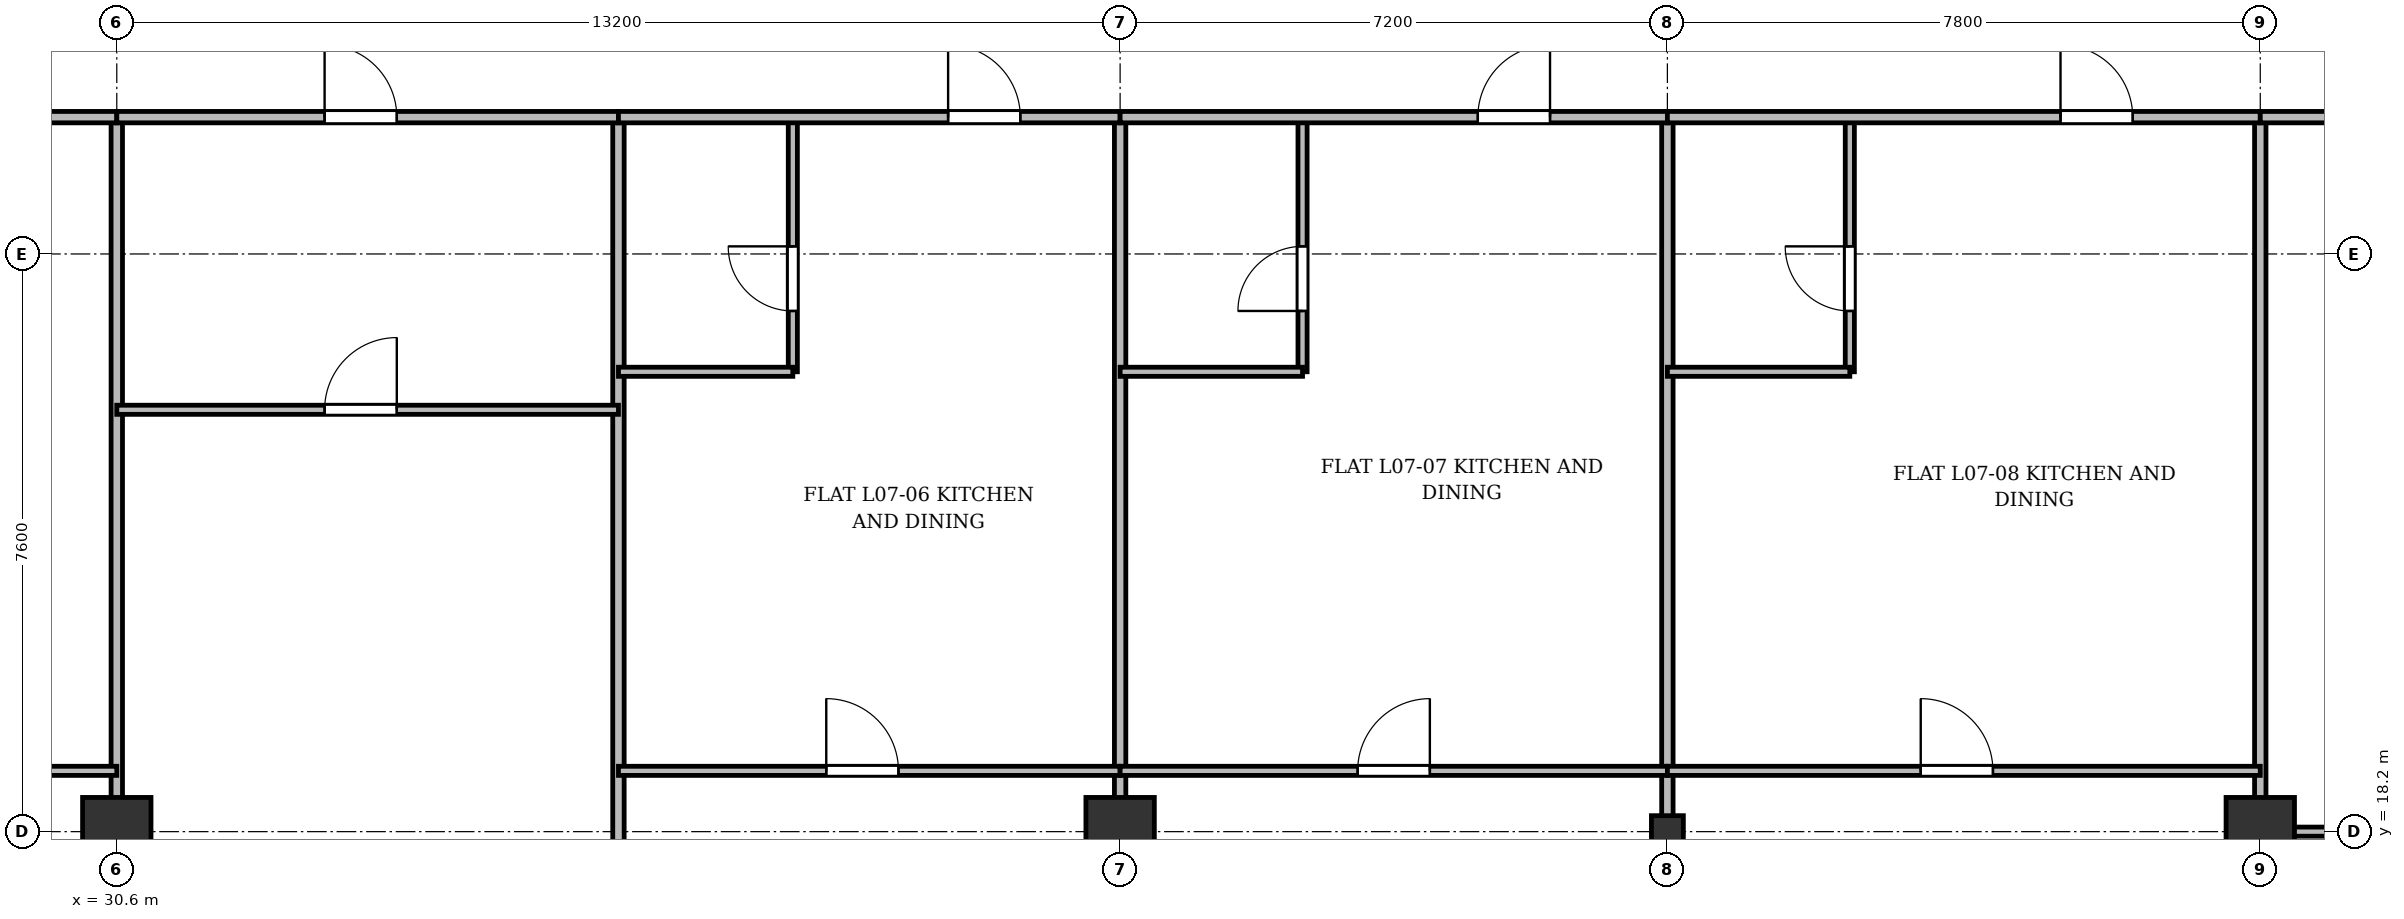
"""IFC4 building model, lengths in metres.
Left out: names, types, materials, properties, quantities, classifications, styles, units other than length and angle.
Written with IfcOpenShell. Run it as: python <this file> out.ifc"""

import sys

from ifc_helpers import new_model, si_unit, direction, frame, frame_2d, origin, origin_2d, place, context, subcontext, project, spatial, rectangle, i_section, extrude, source, transform, mapped, element, fill, save


model = new_model("IFC4")
c1 = context("Model", 3, precision=1e-05, world=origin(), true_north=direction((0.0, 1.0)))
c2 = subcontext(c1, "Body", "Model", "MODEL_VIEW")
j1 = project(units=[si_unit("LENGTHUNIT", "METRE"), si_unit("PLANEANGLEUNIT", "RADIAN")], contexts=[c1])
p1 = place(None, origin())
s1 = spatial("IfcSite", under=j1, at=p1, CompositionType="ELEMENT")
p2 = place(p1, origin())
s2 = spatial("IfcBuilding", under=s1, at=p2, CompositionType="ELEMENT")
p3 = place(p2, frame((0.0, 0.0, 30.7)))
s3 = spatial("IfcBuildingStorey", under=s2, at=p3, CompositionType="ELEMENT", Elevation=30.7)
m1 = source(origin(), c2, "Body", "SweptSolid", [
    extrude(rectangle(XDim=0.9, YDim=0.9, at=origin_2d()), origin(), (0.0, 0.0, 1.0), 3.6),
])
for number, where, z_axis, x_axis in (
    (1, (30.6, 18.2, 0.0), (0.0, 0.0, 1.0), (1.0, 0.0, 0.0)),
    (2, (43.8, 18.2, 0.0), (0.0, 0.0, 1.0), (1.0, 0.0, 0.0)),
):
    element("IfcColumn", number, at=place(p3, frame(where, z_axis=z_axis, x_axis=x_axis)), inside=s3, PredefinedType="COLUMN", context=c2, shape_type="MappedRepresentation", body=[
        mapped(m1, transform((0.0, 0.0, 0.0), x_axis=(1.0, 0.0, 0.0), y_axis=(0.0, 1.0, 0.0), z_axis=(0.0, 0.0, 1.0), scale=1.0)),
    ])
m2 = source(origin(), c2, "Body", "SweptSolid", [
    extrude(i_section(OverallWidth=0.42, OverallDepth=0.42, WebThickness=0.026, FlangeThickness=0.04, at=origin_2d()), origin(), (0.0, 0.0, 1.0), 3.6),
])
p4 = place(p3, frame((51.0, 18.2, 0.0), z_axis=(0.0, 0.0, 1.0), x_axis=(1.0, 0.0, 0.0)))
e3 = element("IfcColumn", 3, at=p4, inside=s3, PredefinedType="COLUMN", context=c2, shape_type="MappedRepresentation", body=[
    mapped(m2, transform((0.0, 0.0, 0.0), x_axis=(1.0, 0.0, 0.0), y_axis=(0.0, 1.0, 0.0), z_axis=(0.0, 0.0, 1.0), scale=1.0)),
])
p5 = place(p3, frame((58.8, 18.2, 0.0), z_axis=(0.0, 0.0, 1.0), x_axis=(1.0, 0.0, 0.0)))
e4 = element("IfcColumn", 4, at=p5, inside=s3, PredefinedType="COLUMN", context=c2, shape_type="MappedRepresentation", body=[
    mapped(m1, transform((0.0, 0.0, 0.0), x_axis=(1.0, 0.0, 0.0), y_axis=(0.0, 1.0, 0.0), z_axis=(0.0, 0.0, 1.0), scale=1.0)),
])
p6 = place(p3, frame((30.6, 3.145, 0.0), z_axis=(0.0, 0.0, 1.0), x_axis=(0.0, 1.0, 0.0)))
e5 = element("IfcWall", 5, at=p6, inside=s3, PredefinedType="PARTITIONING", context=c2, shape_type="SweptSolid", body=[
    extrude(rectangle(XDim=24.455, YDim=0.15, at=frame_2d((12.228, 0.0))), origin(), (0.0, 0.0, 1.0), 2.752),
])
p7 = place(p3, frame((37.2, 3.145, 0.0), z_axis=(0.0, 0.0, 1.0), x_axis=(0.0, 1.0, 0.0)))
e6 = element("IfcWall", 6, at=p7, inside=s3, PredefinedType="PARTITIONING", context=c2, shape_type="SweptSolid", body=[
    extrude(rectangle(XDim=24.455, YDim=0.15, at=frame_2d((12.228, 0.0))), origin(), (0.0, 0.0, 1.0), 2.69),
])
for number, where, z_axis, x_axis in (
    (7, (43.8, 3.145, 0.0), (0.0, 0.0, 1.0), (0.0, 1.0, 0.0)),
    (8, (51.0, 3.145, 0.0), (0.0, 0.0, 1.0), (0.0, 1.0, 0.0)),
    (9, (58.8, 3.145, 0.0), (0.0, 0.0, 1.0), (0.0, 1.0, 0.0)),
):
    element("IfcWall", number, at=place(p3, frame(where, z_axis=z_axis, x_axis=x_axis)), inside=s3, PredefinedType="PARTITIONING", context=c2, shape_type="SweptSolid", body=[
        extrude(rectangle(XDim=24.455, YDim=0.15, at=frame_2d((12.228, 0.0))), origin(), (0.0, 0.0, 1.0), 2.752),
    ])
p8 = place(p3, frame((23.4, 19.0, 0.0), z_axis=(0.0, 0.0, 1.0), x_axis=(1.0, 0.0, 0.0)))
e10 = element("IfcWall", 10, at=p8, inside=s3, PredefinedType="PARTITIONING", context=c2, shape_type="SweptSolid", body=[
    extrude(rectangle(XDim=7.2, YDim=0.12, at=frame_2d((3.6, 0.0))), origin(), (0.0, 0.0, 1.0), 2.752),
])
p9 = place(p8, frame((3.125, 0.0, 0.0)))
e11 = element("IfcOpeningElement", 11, at=p9, cuts=e10, PredefinedType="OPENING", context=c2, shape_type="SweptSolid", body=[
    extrude(rectangle(XDim=0.95, YDim=2.15, at=frame_2d((0.475, 1.075))), frame((0.0, 0.07, 0.0), z_axis=(0.0, -1.0, 0.0), x_axis=(1.0, 0.0, 0.0)), (0.0, 0.0, 1.0), 0.14),
])
p10 = place(p3, frame((23.4, 27.6, 0.0), z_axis=(0.0, 0.0, 1.0), x_axis=(1.0, 0.0, 0.0)))
e12 = element("IfcWall", 12, at=p10, inside=s3, PredefinedType="PARTITIONING", context=c2, shape_type="SweptSolid", body=[
    extrude(rectangle(XDim=7.2, YDim=0.15, at=frame_2d((3.6, 0.0))), origin(), (0.0, 0.0, 1.0), 2.752),
])
p11 = place(p10, frame((4.706, 0.0, 0.0)))
e13 = element("IfcOpeningElement", 13, at=p11, cuts=e12, PredefinedType="OPENING", context=c2, shape_type="SweptSolid", body=[
    extrude(rectangle(XDim=0.95, YDim=2.15, at=frame_2d((0.475, 1.075))), frame((0.0, 0.085, 0.0), z_axis=(0.0, -1.0, 0.0), x_axis=(1.0, 0.0, 0.0)), (0.0, 0.0, 1.0), 0.17),
])
p12 = place(p3, frame((30.6, 27.6, 0.0), z_axis=(0.0, 0.0, 1.0), x_axis=(1.0, 0.0, 0.0)))
e14 = element("IfcWall", 14, at=p12, inside=s3, PredefinedType="PARTITIONING", context=c2, shape_type="SweptSolid", body=[
    extrude(rectangle(XDim=6.6, YDim=0.15, at=frame_2d((3.3, 0.0))), origin(), (0.0, 0.0, 1.0), 2.752),
])
p13 = place(p12, frame((2.734, 0.0, 0.0)))
e15 = element("IfcOpeningElement", 15, at=p13, cuts=e14, PredefinedType="OPENING", context=c2, shape_type="SweptSolid", body=[
    extrude(rectangle(XDim=0.95, YDim=2.15, at=frame_2d((0.475, 1.075))), frame((0.0, 0.085, 0.0), z_axis=(0.0, -1.0, 0.0), x_axis=(1.0, 0.0, 0.0)), (0.0, 0.0, 1.0), 0.17),
])
p14 = place(p3, frame((30.6, 23.75, 0.0), z_axis=(0.0, 0.0, 1.0), x_axis=(1.0, 0.0, 0.0)))
e16 = element("IfcWall", 16, at=p14, inside=s3, PredefinedType="PARTITIONING", context=c2, shape_type="SweptSolid", body=[
    extrude(rectangle(XDim=6.6, YDim=0.12, at=frame_2d((3.3, 0.0))), origin(), (0.0, 0.0, 1.0), 2.752),
])
p15 = place(p14, frame((2.734, 0.0, 0.0)))
e17 = element("IfcOpeningElement", 17, at=p15, cuts=e16, PredefinedType="OPENING", context=c2, shape_type="SweptSolid", body=[
    extrude(rectangle(XDim=0.95, YDim=2.15, at=frame_2d((0.475, 1.075))), frame((0.0, 0.07, 0.0), z_axis=(0.0, -1.0, 0.0), x_axis=(1.0, 0.0, 0.0)), (0.0, 0.0, 1.0), 0.14),
])
p16 = place(p3, frame((37.2, 19.0, 0.0), z_axis=(0.0, 0.0, 1.0), x_axis=(1.0, 0.0, 0.0)))
e18 = element("IfcWall", 18, at=p16, inside=s3, PredefinedType="PARTITIONING", context=c2, shape_type="SweptSolid", body=[
    extrude(rectangle(XDim=6.6, YDim=0.12, at=frame_2d((3.3, 0.0))), origin(), (0.0, 0.0, 1.0), 2.752),
])
p17 = place(p16, frame((2.734, 0.0, 0.0)))
e19 = element("IfcOpeningElement", 19, at=p17, cuts=e18, PredefinedType="OPENING", context=c2, shape_type="SweptSolid", body=[
    extrude(rectangle(XDim=0.95, YDim=2.15, at=frame_2d((0.475, 1.075))), frame((0.0, 0.07, 0.0), z_axis=(0.0, -1.0, 0.0), x_axis=(1.0, 0.0, 0.0)), (0.0, 0.0, 1.0), 0.14),
])
p18 = place(p3, frame((39.494, 24.25, 0.0), z_axis=(0.0, 0.0, 1.0), x_axis=(0.0, 1.0, 0.0)))
e20 = element("IfcWall", 20, at=p18, inside=s3, PredefinedType="PARTITIONING", context=c2, shape_type="SweptSolid", body=[
    extrude(rectangle(XDim=3.35, YDim=0.12, at=frame_2d((1.675, 0.0))), origin(), (0.0, 0.0, 1.0), 2.94),
])
p19 = place(p18, frame((0.8, 0.0, 0.0)))
e21 = element("IfcOpeningElement", 21, at=p19, cuts=e20, PredefinedType="OPENING", context=c2, shape_type="SweptSolid", body=[
    extrude(rectangle(XDim=0.85, YDim=2.1, at=frame_2d((0.425, 1.05))), frame((0.0, 0.07, 0.0), z_axis=(0.0, -1.0, 0.0), x_axis=(1.0, 0.0, 0.0)), (0.0, 0.0, 1.0), 0.14),
])
p20 = place(p3, frame((37.2, 24.25, 0.0), z_axis=(0.0, 0.0, 1.0), x_axis=(1.0, 0.0, 0.0)))
e22 = element("IfcWall", 22, at=p20, inside=s3, PredefinedType="PARTITIONING", context=c2, shape_type="SweptSolid", body=[
    extrude(rectangle(XDim=2.294, YDim=0.12, at=frame_2d((1.147, 0.0))), origin(), (0.0, 0.0, 1.0), 3.34),
])
p21 = place(p3, frame((37.2, 27.6, 0.0), z_axis=(0.0, 0.0, 1.0), x_axis=(1.0, 0.0, 0.0)))
e23 = element("IfcWall", 23, at=p21, inside=s3, PredefinedType="PARTITIONING", context=c2, shape_type="SweptSolid", body=[
    extrude(rectangle(XDim=6.6, YDim=0.15, at=frame_2d((3.3, 0.0))), origin(), (0.0, 0.0, 1.0), 2.752),
])
p22 = place(p21, frame((4.337, 0.0, 0.0)))
e24 = element("IfcOpeningElement", 24, at=p22, cuts=e23, PredefinedType="OPENING", context=c2, shape_type="SweptSolid", body=[
    extrude(rectangle(XDim=0.95, YDim=2.15, at=frame_2d((0.475, 1.075))), frame((0.0, 0.085, 0.0), z_axis=(0.0, -1.0, 0.0), x_axis=(1.0, 0.0, 0.0)), (0.0, 0.0, 1.0), 0.17),
])
p23 = place(p3, frame((43.8, 19.0, 0.0), z_axis=(0.0, 0.0, 1.0), x_axis=(1.0, 0.0, 0.0)))
e25 = element("IfcWall", 25, at=p23, inside=s3, PredefinedType="PARTITIONING", context=c2, shape_type="SweptSolid", body=[
    extrude(rectangle(XDim=7.2, YDim=0.12, at=frame_2d((3.6, 0.0))), origin(), (0.0, 0.0, 1.0), 2.752),
])
p24 = place(p23, frame((3.125, 0.0, 0.0)))
e26 = element("IfcOpeningElement", 26, at=p24, cuts=e25, PredefinedType="OPENING", context=c2, shape_type="SweptSolid", body=[
    extrude(rectangle(XDim=0.95, YDim=2.15, at=frame_2d((0.475, 1.075))), frame((0.0, 0.07, 0.0), z_axis=(0.0, -1.0, 0.0), x_axis=(1.0, 0.0, 0.0)), (0.0, 0.0, 1.0), 0.14),
])
p25 = place(p3, frame((46.2, 24.25, 0.0), z_axis=(0.0, 0.0, 1.0), x_axis=(0.0, 1.0, 0.0)))
e27 = element("IfcWall", 27, at=p25, inside=s3, PredefinedType="PARTITIONING", context=c2, shape_type="SweptSolid", body=[
    extrude(rectangle(XDim=3.35, YDim=0.12, at=frame_2d((1.675, 0.0))), origin(), (0.0, 0.0, 1.0), 2.94),
])
p26 = place(p25, frame((0.8, 0.0, 0.0)))
e28 = element("IfcOpeningElement", 28, at=p26, cuts=e27, PredefinedType="OPENING", context=c2, shape_type="SweptSolid", body=[
    extrude(rectangle(XDim=0.85, YDim=2.1, at=frame_2d((0.425, 1.05))), frame((0.0, 0.07, 0.0), z_axis=(0.0, -1.0, 0.0), x_axis=(1.0, 0.0, 0.0)), (0.0, 0.0, 1.0), 0.14),
])
p27 = place(p3, frame((43.8, 24.25, 0.0), z_axis=(0.0, 0.0, 1.0), x_axis=(1.0, 0.0, 0.0)))
e29 = element("IfcWall", 29, at=p27, inside=s3, PredefinedType="PARTITIONING", context=c2, shape_type="SweptSolid", body=[
    extrude(rectangle(XDim=2.4, YDim=0.12, at=frame_2d((1.2, 0.0))), origin(), (0.0, 0.0, 1.0), 2.752),
])
p28 = place(p3, frame((43.8, 27.6, 0.0), z_axis=(0.0, 0.0, 1.0), x_axis=(1.0, 0.0, 0.0)))
e30 = element("IfcWall", 30, at=p28, inside=s3, PredefinedType="PARTITIONING", context=c2, shape_type="SweptSolid", body=[
    extrude(rectangle(XDim=7.2, YDim=0.15, at=frame_2d((3.6, 0.0))), origin(), (0.0, 0.0, 1.0), 2.752),
])
p29 = place(p28, frame((4.706, 0.0, 0.0)))
e31 = element("IfcOpeningElement", 31, at=p29, cuts=e30, PredefinedType="OPENING", context=c2, shape_type="SweptSolid", body=[
    extrude(rectangle(XDim=0.95, YDim=2.15, at=frame_2d((0.475, 1.075))), frame((0.0, 0.085, 0.0), z_axis=(0.0, -1.0, 0.0), x_axis=(1.0, 0.0, 0.0)), (0.0, 0.0, 1.0), 0.17),
])
p30 = place(p3, frame((51.0, 19.0, 0.0), z_axis=(0.0, 0.0, 1.0), x_axis=(1.0, 0.0, 0.0)))
e32 = element("IfcWall", 32, at=p30, inside=s3, PredefinedType="PARTITIONING", context=c2, shape_type="SweptSolid", body=[
    extrude(rectangle(XDim=7.8, YDim=0.12, at=frame_2d((3.9, 0.0))), origin(), (0.0, 0.0, 1.0), 2.752),
])
p31 = place(p30, frame((3.333, 0.0, 0.0)))
e33 = element("IfcOpeningElement", 33, at=p31, cuts=e32, PredefinedType="OPENING", context=c2, shape_type="SweptSolid", body=[
    extrude(rectangle(XDim=0.95, YDim=2.15, at=frame_2d((0.475, 1.075))), frame((0.0, 0.07, 0.0), z_axis=(0.0, -1.0, 0.0), x_axis=(1.0, 0.0, 0.0)), (0.0, 0.0, 1.0), 0.14),
])
p32 = place(p3, frame((53.4, 24.25, 0.0), z_axis=(0.0, 0.0, 1.0), x_axis=(0.0, 1.0, 0.0)))
e34 = element("IfcWall", 34, at=p32, inside=s3, PredefinedType="PARTITIONING", context=c2, shape_type="SweptSolid", body=[
    extrude(rectangle(XDim=3.35, YDim=0.12, at=frame_2d((1.675, 0.0))), origin(), (0.0, 0.0, 1.0), 2.94),
])
p33 = place(p32, frame((0.8, 0.0, 0.0)))
e35 = element("IfcOpeningElement", 35, at=p33, cuts=e34, PredefinedType="OPENING", context=c2, shape_type="SweptSolid", body=[
    extrude(rectangle(XDim=0.85, YDim=2.1, at=frame_2d((0.425, 1.05))), frame((0.0, 0.07, 0.0), z_axis=(0.0, -1.0, 0.0), x_axis=(1.0, 0.0, 0.0)), (0.0, 0.0, 1.0), 0.14),
])
p34 = place(p3, frame((51.0, 24.25, 0.0), z_axis=(0.0, 0.0, 1.0), x_axis=(1.0, 0.0, 0.0)))
e36 = element("IfcWall", 36, at=p34, inside=s3, PredefinedType="PARTITIONING", context=c2, shape_type="SweptSolid", body=[
    extrude(rectangle(XDim=2.4, YDim=0.12, at=frame_2d((1.2, 0.0))), origin(), (0.0, 0.0, 1.0), 2.752),
])
p35 = place(p3, frame((51.0, 27.6, 0.0), z_axis=(0.0, 0.0, 1.0), x_axis=(1.0, 0.0, 0.0)))
e37 = element("IfcWall", 37, at=p35, inside=s3, PredefinedType="PARTITIONING", context=c2, shape_type="SweptSolid", body=[
    extrude(rectangle(XDim=7.8, YDim=0.15, at=frame_2d((3.9, 0.0))), origin(), (0.0, 0.0, 1.0), 2.752),
])
p36 = place(p35, frame((5.172, 0.0, 0.0)))
e38 = element("IfcOpeningElement", 38, at=p36, cuts=e37, PredefinedType="OPENING", context=c2, shape_type="SweptSolid", body=[
    extrude(rectangle(XDim=0.95, YDim=2.15, at=frame_2d((0.475, 1.075))), frame((0.0, 0.085, 0.0), z_axis=(0.0, -1.0, 0.0), x_axis=(1.0, 0.0, 0.0)), (0.0, 0.0, 1.0), 0.17),
])
p37 = place(p3, frame((58.8, 27.6, 0.0), z_axis=(0.0, 0.0, 1.0), x_axis=(1.0, 0.0, 0.0)))
e39 = element("IfcWall", 39, at=p37, inside=s3, PredefinedType="PARTITIONING", context=c2, shape_type="SweptSolid", body=[
    extrude(rectangle(XDim=6.8, YDim=0.15, at=frame_2d((3.4, 0.0))), origin(), (0.0, 0.0, 1.0), 2.752),
])
p38 = place(p37, frame((2.925, 0.0, 0.0)))
e40 = element("IfcOpeningElement", 40, at=p38, cuts=e39, PredefinedType="OPENING", context=c2, shape_type="SweptSolid", body=[
    extrude(rectangle(XDim=0.95, YDim=2.15, at=frame_2d((0.475, 1.075))), frame((0.0, 0.085, 0.0), z_axis=(0.0, -1.0, 0.0), x_axis=(1.0, 0.0, 0.0)), (0.0, 0.0, 1.0), 0.17),
])
p39 = place(p3, frame((58.8, 18.2, 0.0), z_axis=(0.0, 0.0, 1.0), x_axis=(1.0, 0.0, 0.0)))
e41 = element("IfcWall", 41, at=p39, inside=s3, PredefinedType="PARTITIONING", context=c2, shape_type="SweptSolid", body=[
    extrude(rectangle(XDim=6.8, YDim=0.12, at=frame_2d((3.4, 0.0))), origin(), (0.0, 0.0, 1.0), 2.69),
])
p40 = place(p39, frame((2.925, 0.0, 0.0)))
e42 = element("IfcOpeningElement", 42, at=p40, cuts=e41, PredefinedType="OPENING", context=c2, shape_type="SweptSolid", body=[
    extrude(rectangle(XDim=0.95, YDim=2.15, at=frame_2d((0.475, 1.075))), frame((0.0, 0.07, 0.0), z_axis=(0.0, -1.0, 0.0), x_axis=(1.0, 0.0, 0.0)), (0.0, 0.0, 1.0), 0.14),
])
m3 = source(origin(), c2, "Body", "SweptSolid", [
    extrude(rectangle(XDim=0.95, YDim=2.15, at=frame_2d((0.475, 1.075))), frame((0.0, 0.025, 0.0), z_axis=(0.0, -1.0, 0.0), x_axis=(1.0, 0.0, 0.0)), (0.0, 0.0, 1.0), 0.05),
])
p41 = place(p13, origin())
e43 = element("IfcDoor", 43, at=p41, inside=s3, OperationType="SINGLE_SWING_LEFT", PredefinedType="DOOR", context=c2, shape_type="MappedRepresentation", body=[
    mapped(m3, transform((0.0, 0.0, 0.0), x_axis=(1.0, 0.0, 0.0), y_axis=(0.0, 1.0, 0.0), z_axis=(0.0, 0.0, 1.0), scale=1.0)),
])
fill(e15, e43)
p42 = place(p15, origin())
e44 = element("IfcDoor", 44, at=p42, inside=s3, OperationType="SINGLE_SWING_RIGHT", PredefinedType="DOOR", context=c2, shape_type="MappedRepresentation", body=[
    mapped(m3, transform((0.0, 0.0, 0.0), x_axis=(1.0, 0.0, 0.0), y_axis=(0.0, 1.0, 0.0), z_axis=(0.0, 0.0, 1.0), scale=1.0)),
])
fill(e17, e44)
p43 = place(p17, origin())
e45 = element("IfcDoor", 45, at=p43, inside=s3, OperationType="SINGLE_SWING_LEFT", PredefinedType="DOOR", context=c2, shape_type="MappedRepresentation", body=[
    mapped(m3, transform((0.0, 0.0, 0.0), x_axis=(1.0, 0.0, 0.0), y_axis=(0.0, 1.0, 0.0), z_axis=(0.0, 0.0, 1.0), scale=1.0)),
])
fill(e19, e45)
m4 = source(origin(), c2, "Body", "SweptSolid", [
    extrude(rectangle(XDim=0.85, YDim=2.1, at=frame_2d((0.425, 1.05))), frame((0.0, 0.025, 0.0), z_axis=(0.0, -1.0, 0.0), x_axis=(1.0, 0.0, 0.0)), (0.0, 0.0, 1.0), 0.05),
])
p44 = place(p19, origin())
e46 = element("IfcDoor", 46, at=p44, inside=s3, OperationType="SINGLE_SWING_RIGHT", PredefinedType="DOOR", context=c2, shape_type="MappedRepresentation", body=[
    mapped(m4, transform((0.0, 0.0, 0.0), x_axis=(1.0, 0.0, 0.0), y_axis=(0.0, 1.0, 0.0), z_axis=(0.0, 0.0, 1.0), scale=1.0)),
])
fill(e21, e46)
p45 = place(p22, origin())
e47 = element("IfcDoor", 47, at=p45, inside=s3, OperationType="SINGLE_SWING_LEFT", PredefinedType="DOOR", context=c2, shape_type="MappedRepresentation", body=[
    mapped(m3, transform((0.0, 0.0, 0.0), x_axis=(1.0, 0.0, 0.0), y_axis=(0.0, 1.0, 0.0), z_axis=(0.0, 0.0, 1.0), scale=1.0)),
])
fill(e24, e47)
p46 = place(p24, origin())
e48 = element("IfcDoor", 48, at=p46, inside=s3, OperationType="SINGLE_SWING_RIGHT", PredefinedType="DOOR", context=c2, shape_type="MappedRepresentation", body=[
    mapped(m3, transform((0.0, 0.0, 0.0), x_axis=(1.0, 0.0, 0.0), y_axis=(0.0, 1.0, 0.0), z_axis=(0.0, 0.0, 1.0), scale=1.0)),
])
fill(e26, e48)
p47 = place(p26, origin())
e49 = element("IfcDoor", 49, at=p47, inside=s3, OperationType="SINGLE_SWING_LEFT", PredefinedType="DOOR", context=c2, shape_type="MappedRepresentation", body=[
    mapped(m4, transform((0.0, 0.0, 0.0), x_axis=(1.0, 0.0, 0.0), y_axis=(0.0, 1.0, 0.0), z_axis=(0.0, 0.0, 1.0), scale=1.0)),
])
fill(e28, e49)
p48 = place(p29, origin())
e50 = element("IfcDoor", 50, at=p48, inside=s3, OperationType="SINGLE_SWING_RIGHT", PredefinedType="DOOR", context=c2, shape_type="MappedRepresentation", body=[
    mapped(m3, transform((0.0, 0.0, 0.0), x_axis=(1.0, 0.0, 0.0), y_axis=(0.0, 1.0, 0.0), z_axis=(0.0, 0.0, 1.0), scale=1.0)),
])
fill(e31, e50)
p49 = place(p31, origin())
e51 = element("IfcDoor", 51, at=p49, inside=s3, OperationType="SINGLE_SWING_LEFT", PredefinedType="DOOR", context=c2, shape_type="MappedRepresentation", body=[
    mapped(m3, transform((0.0, 0.0, 0.0), x_axis=(1.0, 0.0, 0.0), y_axis=(0.0, 1.0, 0.0), z_axis=(0.0, 0.0, 1.0), scale=1.0)),
])
fill(e33, e51)
p50 = place(p33, origin())
e52 = element("IfcDoor", 52, at=p50, inside=s3, OperationType="SINGLE_SWING_RIGHT", PredefinedType="DOOR", context=c2, shape_type="MappedRepresentation", body=[
    mapped(m4, transform((0.0, 0.0, 0.0), x_axis=(1.0, 0.0, 0.0), y_axis=(0.0, 1.0, 0.0), z_axis=(0.0, 0.0, 1.0), scale=1.0)),
])
fill(e35, e52)
p51 = place(p36, origin())
e53 = element("IfcDoor", 53, at=p51, inside=s3, OperationType="SINGLE_SWING_LEFT", PredefinedType="DOOR", context=c2, shape_type="MappedRepresentation", body=[
    mapped(m3, transform((0.0, 0.0, 0.0), x_axis=(1.0, 0.0, 0.0), y_axis=(0.0, 1.0, 0.0), z_axis=(0.0, 0.0, 1.0), scale=1.0)),
])
fill(e38, e53)
save(model, sys.argv[1])
